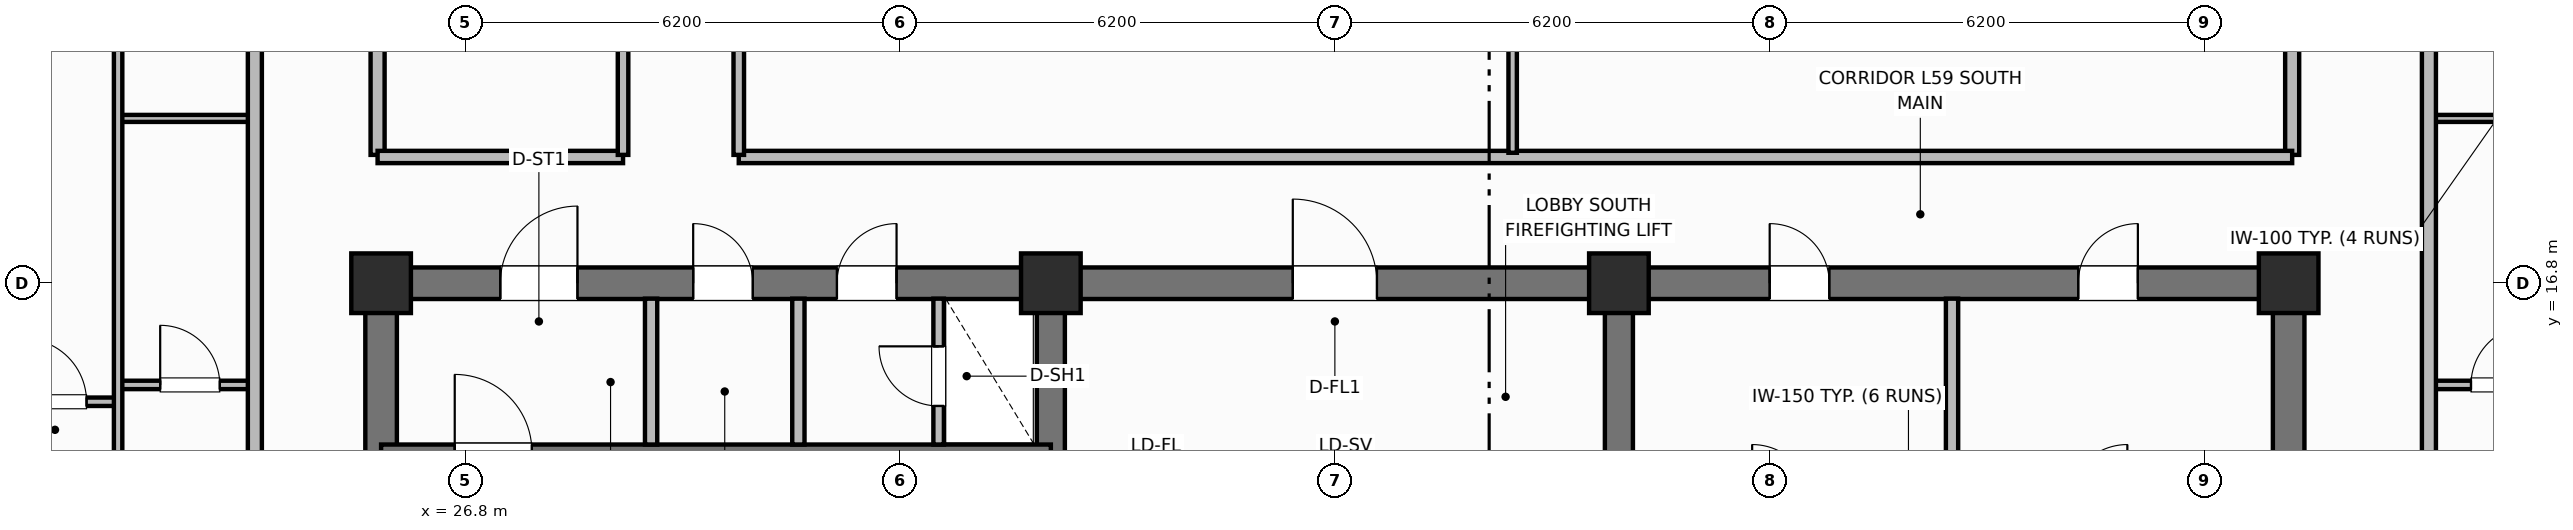
"""IFC4 building model, lengths in metres.
Left out: names, types, materials, properties, quantities, classifications, styles, units other than length and angle.
Written with IfcOpenShell. Run it as: python <this file> out.ifc"""

import sys

from ifc_helpers import new_model, si_unit, direction, frame, frame_2d, origin, origin_2d, place, context, subcontext, project, spatial, rectangle, extrude, element, fill, save


model = new_model("IFC4")
c1 = context("Model", 3, precision=1e-05, world=origin(), true_north=direction((0.0, 1.0)))
c2 = subcontext(c1, "Body", "Model", "MODEL_VIEW")
j1 = project(units=[si_unit("LENGTHUNIT", "METRE"), si_unit("PLANEANGLEUNIT", "RADIAN")], contexts=[c1])
p1 = place(None, origin())
s1 = spatial("IfcSite", under=j1, at=p1, CompositionType="ELEMENT")
p2 = place(p1, origin())
s2 = spatial("IfcBuilding", under=s1, at=p2, CompositionType="ELEMENT")
p3 = place(p2, frame((0.0, 0.0, 236.9)))
s3 = spatial("IfcBuildingStorey", under=s2, at=p3, CompositionType="ELEMENT", Elevation=236.9)
for number, where, z_axis, x_axis in (
    (1, (25.6, 10.825, 0.0), (0.0, 0.0, 1.0), (0.0, 1.0, 0.0)),
    (2, (52.8, 10.825, 0.0), (0.0, 0.0, 1.0), (0.0, 1.0, 0.0)),
):
    element("IfcWall", number, at=place(p3, frame(where, z_axis=z_axis, x_axis=x_axis)), inside=s3, PredefinedType="SHEAR", context=c2, shape_type="SweptSolid", body=[
        extrude(rectangle(XDim=5.75, YDim=0.45, at=frame_2d((2.875, 0.0))), origin(), (0.0, 0.0, 1.0), 3.7),
    ])
p4 = place(p3, frame((25.6, 16.8, 0.0), z_axis=(0.0, 0.0, 1.0), x_axis=(1.0, 0.0, 0.0)))
e3 = element("IfcWall", 3, at=p4, inside=s3, PredefinedType="SHEAR", context=c2, shape_type="SweptSolid", body=[
    extrude(rectangle(XDim=27.2, YDim=0.45, at=frame_2d((13.6, 0.0))), origin(), (0.0, 0.0, 1.0), 3.7),
])
p5 = place(p4, frame((1.7, 0.0, 0.0)))
e4 = element("IfcOpeningElement", 4, at=p5, cuts=e3, PredefinedType="OPENING", context=c2, shape_type="SweptSolid", body=[
    extrude(rectangle(XDim=1.1, YDim=2.15, at=frame_2d((0.55, 1.075))), frame((0.0, 0.235, 0.0), z_axis=(0.0, -1.0, 0.0), x_axis=(1.0, 0.0, 0.0)), (0.0, 0.0, 1.0), 0.47),
])
p6 = place(p4, frame((4.45, 0.0, 0.0)))
e5 = element("IfcOpeningElement", 5, at=p6, cuts=e3, PredefinedType="OPENING", context=c2, shape_type="SweptSolid", body=[
    extrude(rectangle(XDim=0.85, YDim=2.1, at=frame_2d((0.425, 1.05))), frame((0.0, 0.235, 0.0), z_axis=(0.0, -1.0, 0.0), x_axis=(1.0, 0.0, 0.0)), (0.0, 0.0, 1.0), 0.47),
])
p7 = place(p4, frame((6.5, 0.0, 0.0)))
e6 = element("IfcOpeningElement", 6, at=p7, cuts=e3, PredefinedType="OPENING", context=c2, shape_type="SweptSolid", body=[
    extrude(rectangle(XDim=0.85, YDim=2.1, at=frame_2d((0.425, 1.05))), frame((0.0, 0.235, 0.0), z_axis=(0.0, -1.0, 0.0), x_axis=(1.0, 0.0, 0.0)), (0.0, 0.0, 1.0), 0.47),
])
p8 = place(p4, frame((13.0, 0.0, 0.0)))
e7 = element("IfcOpeningElement", 7, at=p8, cuts=e3, PredefinedType="OPENING", context=c2, shape_type="SweptSolid", body=[
    extrude(rectangle(XDim=1.2, YDim=2.15, at=frame_2d((0.6, 1.075))), frame((0.0, 0.235, 0.0), z_axis=(0.0, -1.0, 0.0), x_axis=(1.0, 0.0, 0.0)), (0.0, 0.0, 1.0), 0.47),
])
p9 = place(p4, frame((19.8, 0.0, 0.0)))
e8 = element("IfcOpeningElement", 8, at=p9, cuts=e3, PredefinedType="OPENING", context=c2, shape_type="SweptSolid", body=[
    extrude(rectangle(XDim=0.85, YDim=2.1, at=frame_2d((0.425, 1.05))), frame((0.0, 0.235, 0.0), z_axis=(0.0, -1.0, 0.0), x_axis=(1.0, 0.0, 0.0)), (0.0, 0.0, 1.0), 0.47),
])
p10 = place(p4, frame((24.2, 0.0, 0.0)))
e9 = element("IfcOpeningElement", 9, at=p10, cuts=e3, PredefinedType="OPENING", context=c2, shape_type="SweptSolid", body=[
    extrude(rectangle(XDim=0.85, YDim=2.1, at=frame_2d((0.425, 1.05))), frame((0.0, 0.235, 0.0), z_axis=(0.0, -1.0, 0.0), x_axis=(1.0, 0.0, 0.0)), (0.0, 0.0, 1.0), 0.47),
])
for number, where, z_axis, x_axis in (
    (10, (35.15, 10.825, 0.0), (0.0, 0.0, 1.0), (0.0, 1.0, 0.0)),
    (11, (43.25, 10.825, 0.0), (0.0, 0.0, 1.0), (0.0, 1.0, 0.0)),
):
    element("IfcWall", number, at=place(p3, frame(where, z_axis=z_axis, x_axis=x_axis)), inside=s3, PredefinedType="SHEAR", context=c2, shape_type="SweptSolid", body=[
        extrude(rectangle(XDim=5.75, YDim=0.4, at=frame_2d((2.875, 0.0))), origin(), (0.0, 0.0, 1.0), 3.7),
    ])
for number, where, z_axis, x_axis in (
    (12, (25.6, 16.8, 0.0), (0.0, 0.0, 1.0), (1.0, 0.0, 0.0)),
    (13, (35.15, 16.8, 0.0), (0.0, 0.0, 1.0), (1.0, 0.0, 0.0)),
    (14, (43.25, 16.8, 0.0), (0.0, 0.0, 1.0), (1.0, 0.0, 0.0)),
    (15, (52.8, 16.8, 0.0), (0.0, 0.0, 1.0), (1.0, 0.0, 0.0)),
):
    element("IfcColumn", number, at=place(p3, frame(where, z_axis=z_axis, x_axis=x_axis)), inside=s3, PredefinedType="COLUMN", context=c2, shape_type="SweptSolid", body=[
        extrude(rectangle(XDim=0.85, YDim=0.85, at=origin_2d()), origin(), (0.0, 0.0, 1.0), 3.7),
    ])
p11 = place(p3, frame((25.6, 14.4, 0.0), z_axis=(0.0, 0.0, 1.0), x_axis=(1.0, 0.0, 0.0)))
e16 = element("IfcWall", 16, at=p11, inside=s3, PredefinedType="SHEAR", context=c2, shape_type="SweptSolid", body=[
    extrude(rectangle(XDim=9.55, YDim=0.2, at=frame_2d((4.775, 0.0))), origin(), (0.0, 0.0, 1.0), 3.7),
])
p12 = place(p11, frame((1.05, 0.0, 0.0)))
e17 = element("IfcOpeningElement", 17, at=p12, cuts=e16, PredefinedType="OPENING", context=c2, shape_type="SweptSolid", body=[
    extrude(rectangle(XDim=1.1, YDim=2.15, at=frame_2d((0.55, 1.075))), frame((0.0, 0.11, 0.0), z_axis=(0.0, -1.0, 0.0), x_axis=(1.0, 0.0, 0.0)), (0.0, 0.0, 1.0), 0.22),
])
for number, where, z_axis, x_axis in (
    (18, (29.45, 14.5, 0.0), (0.0, 0.0, 1.0), (0.0, 1.0, 0.0)),
    (19, (31.55, 14.5, 0.0), (0.0, 0.0, 1.0), (0.0, 1.0, 0.0)),
):
    element("IfcWall", number, at=place(p3, frame(where, z_axis=z_axis, x_axis=x_axis)), inside=s3, PredefinedType="PARTITIONING", context=c2, shape_type="SweptSolid", body=[
        extrude(rectangle(XDim=2.08, YDim=0.175, at=frame_2d((1.04, 0.0))), origin(), (0.0, 0.0, 1.0), 2.56),
    ])
p13 = place(p3, frame((33.55, 14.5, 0.0), z_axis=(0.0, 0.0, 1.0), x_axis=(0.0, 1.0, 0.0)))
e20 = element("IfcWall", 20, at=p13, inside=s3, PredefinedType="PARTITIONING", context=c2, shape_type="SweptSolid", body=[
    extrude(rectangle(XDim=2.08, YDim=0.15, at=frame_2d((1.04, 0.0))), origin(), (0.0, 0.0, 1.0), 2.56),
])
p14 = place(p13, frame((0.55, 0.0, 0.0)))
e21 = element("IfcOpeningElement", 21, at=p14, cuts=e20, PredefinedType="OPENING", context=c2, shape_type="SweptSolid", body=[
    extrude(rectangle(XDim=0.85, YDim=2.05, at=frame_2d((0.425, 1.025))), frame((0.0, 0.085, 0.0), z_axis=(0.0, -1.0, 0.0), x_axis=(1.0, 0.0, 0.0)), (0.0, 0.0, 1.0), 0.17),
])
p15 = place(p3, frame((48.0, 10.95, 0.0), z_axis=(0.0, 0.0, 1.0), x_axis=(0.0, 1.0, 0.0)))
e22 = element("IfcWall", 22, at=p15, inside=s3, PredefinedType="PARTITIONING", context=c2, shape_type="SweptSolid", body=[
    extrude(rectangle(XDim=5.63, YDim=0.175, at=frame_2d((2.815, 0.0))), origin(), (0.0, 0.0, 1.0), 2.56),
])
for number, where, z_axis, x_axis in (
    (23, (25.55, 18.63, 0.0), (0.0, 0.0, 1.0), (0.0, 1.0, 0.0)),
    (24, (52.85, 18.63, 0.0), (0.0, 0.0, 1.0), (0.0, 1.0, 0.0)),
):
    element("IfcWall", number, at=place(p3, frame(where, z_axis=z_axis, x_axis=x_axis)), inside=s3, PredefinedType="PARTITIONING", context=c2, shape_type="SweptSolid", body=[
        extrude(rectangle(XDim=19.14, YDim=0.2, at=frame_2d((9.57, 0.0))), origin(), (0.0, 0.0, 1.0), 2.56),
    ])
p16 = place(p3, frame((25.55, 18.6, 0.0), z_axis=(0.0, 0.0, 1.0), x_axis=(1.0, 0.0, 0.0)))
e25 = element("IfcWall", 25, at=p16, inside=s3, PredefinedType="PARTITIONING", context=c2, shape_type="SweptSolid", body=[
    extrude(rectangle(XDim=3.5, YDim=0.175, at=frame_2d((1.75, 0.0))), origin(), (0.0, 0.0, 1.0), 2.56),
])
p17 = place(p3, frame((30.7, 18.6, 0.0), z_axis=(0.0, 0.0, 1.0), x_axis=(1.0, 0.0, 0.0)))
e26 = element("IfcWall", 26, at=p17, inside=s3, PredefinedType="PARTITIONING", context=c2, shape_type="SweptSolid", body=[
    extrude(rectangle(XDim=22.15, YDim=0.175, at=frame_2d((11.075, 0.0))), origin(), (0.0, 0.0, 1.0), 2.56),
])
p18 = place(p3, frame((41.735, 18.66, 0.0), z_axis=(0.0, 0.0, 1.0), x_axis=(0.0, 1.0, 0.0)))
e27 = element("IfcWall", 27, at=p18, inside=s3, PredefinedType="PARTITIONING", context=c2, shape_type="SweptSolid", body=[
    extrude(rectangle(XDim=10.648, YDim=0.12, at=frame_2d((5.324, 0.0))), origin(), (0.0, 0.0, 1.0), 2.56),
])
p19 = place(p18, frame((2.0, 0.0, 0.0)))
e28 = element("IfcOpeningElement", 28, at=p19, cuts=e27, PredefinedType="OPENING", context=c2, shape_type="SweptSolid", body=[
    extrude(rectangle(XDim=0.9, YDim=2.1, at=frame_2d((0.45, 1.05))), frame((0.0, 0.07, 0.0), z_axis=(0.0, -1.0, 0.0), x_axis=(1.0, 0.0, 0.0)), (0.0, 0.0, 1.0), 0.14),
])
p20 = place(p3, frame((29.05, 18.63, 0.0), z_axis=(0.0, 0.0, 1.0), x_axis=(0.0, 1.0, 0.0)))
e29 = element("IfcWall", 29, at=p20, inside=s3, PredefinedType="PARTITIONING", context=c2, shape_type="SweptSolid", body=[
    extrude(rectangle(XDim=19.14, YDim=0.15, at=frame_2d((9.57, 0.0))), origin(), (0.0, 0.0, 1.0), 2.56),
])
p21 = place(p20, frame((5.5, 0.0, 0.0)))
e30 = element("IfcOpeningElement", 30, at=p21, cuts=e29, PredefinedType="OPENING", context=c2, shape_type="SweptSolid", body=[
    extrude(rectangle(XDim=1.0, YDim=2.15, at=frame_2d((0.5, 1.075))), frame((0.0, 0.085, 0.0), z_axis=(0.0, -1.0, 0.0), x_axis=(1.0, 0.0, 0.0)), (0.0, 0.0, 1.0), 0.17),
])
p22 = place(p3, frame((30.7, 18.63, 0.0), z_axis=(0.0, 0.0, 1.0), x_axis=(0.0, 1.0, 0.0)))
e31 = element("IfcWall", 31, at=p22, inside=s3, PredefinedType="PARTITIONING", context=c2, shape_type="SweptSolid", body=[
    extrude(rectangle(XDim=19.14, YDim=0.15, at=frame_2d((9.57, 0.0))), origin(), (0.0, 0.0, 1.0), 2.56),
])
p23 = place(p22, frame((2.2, 0.0, 0.0)))
e32 = element("IfcOpeningElement", 32, at=p23, cuts=e31, PredefinedType="OPENING", context=c2, shape_type="SweptSolid", body=[
    extrude(rectangle(XDim=1.0, YDim=2.15, at=frame_2d((0.5, 1.075))), frame((0.0, 0.085, 0.0), z_axis=(0.0, -1.0, 0.0), x_axis=(1.0, 0.0, 0.0)), (0.0, 0.0, 1.0), 0.17),
])
p24 = place(p22, frame((12.719, 0.0, 0.0)))
e33 = element("IfcOpeningElement", 33, at=p24, cuts=e31, PredefinedType="OPENING", context=c2, shape_type="SweptSolid", body=[
    extrude(rectangle(XDim=1.0, YDim=2.15, at=frame_2d((0.5, 1.075))), frame((0.0, 0.085, 0.0), z_axis=(0.0, -1.0, 0.0), x_axis=(1.0, 0.0, 0.0)), (0.0, 0.0, 1.0), 0.17),
])
p25 = place(p3, frame((21.85, 15.35, 0.0), z_axis=(0.0, 0.0, 1.0), x_axis=(1.0, 0.0, 0.0)))
e34 = element("IfcWall", 34, at=p25, inside=s3, PredefinedType="PARTITIONING", context=c2, shape_type="SweptSolid", body=[
    extrude(rectangle(XDim=1.95, YDim=0.12, at=frame_2d((0.975, 0.0))), origin(), (0.0, 0.0, 1.0), 2.56),
])
p26 = place(p25, frame((0.6, 0.0, 0.0)))
e35 = element("IfcOpeningElement", 35, at=p26, cuts=e34, PredefinedType="OPENING", context=c2, shape_type="SweptSolid", body=[
    extrude(rectangle(XDim=0.85, YDim=2.1, at=frame_2d((0.425, 1.05))), frame((0.0, 0.07, 0.0), z_axis=(0.0, -1.0, 0.0), x_axis=(1.0, 0.0, 0.0)), (0.0, 0.0, 1.0), 0.14),
])
p27 = place(p3, frame((21.85, 19.15, 0.0), z_axis=(0.0, 0.0, 1.0), x_axis=(1.0, 0.0, 0.0)))
e36 = element("IfcWall", 36, at=p27, inside=s3, PredefinedType="PARTITIONING", context=c2, shape_type="SweptSolid", body=[
    extrude(rectangle(XDim=1.95, YDim=0.1, at=frame_2d((0.975, 0.0))), origin(), (0.0, 0.0, 1.0), 2.56),
])
p28 = place(p3, frame((19.53, 15.11, 0.0), z_axis=(0.0, 0.0, 1.0), x_axis=(1.0, 0.0, 0.0)))
e37 = element("IfcWall", 37, at=p28, inside=s3, PredefinedType="PARTITIONING", context=c2, shape_type="SweptSolid", body=[
    extrude(rectangle(XDim=2.32, YDim=0.12, at=frame_2d((1.16, 0.0))), origin(), (0.0, 0.0, 1.0), 2.56),
])
p29 = place(p28, frame((0.97, 0.0, 0.0)))
e38 = element("IfcOpeningElement", 38, at=p29, cuts=e37, PredefinedType="OPENING", context=c2, shape_type="SweptSolid", body=[
    extrude(rectangle(XDim=0.9, YDim=2.1, at=frame_2d((0.45, 1.05))), frame((0.0, 0.07, 0.0), z_axis=(0.0, -1.0, 0.0), x_axis=(1.0, 0.0, 0.0)), (0.0, 0.0, 1.0), 0.14),
])
p30 = place(p3, frame((21.85, 9.99, 0.0), z_axis=(0.0, 0.0, 1.0), x_axis=(0.0, 1.0, 0.0)))
e39 = element("IfcWall", 39, at=p30, inside=s3, PredefinedType="PARTITIONING", context=c2, shape_type="SweptSolid", body=[
    extrude(rectangle(XDim=12.67, YDim=0.12, at=frame_2d((6.335, 0.0))), origin(), (0.0, 0.0, 1.0), 2.56),
])
p31 = place(p30, frame((0.41, 0.0, 0.0)))
e40 = element("IfcOpeningElement", 40, at=p31, cuts=e39, PredefinedType="OPENING", context=c2, shape_type="SweptSolid", body=[
    extrude(rectangle(XDim=0.9, YDim=2.1, at=frame_2d((0.45, 1.05))), frame((0.0, 0.07, 0.0), z_axis=(0.0, -1.0, 0.0), x_axis=(1.0, 0.0, 0.0)), (0.0, 0.0, 1.0), 0.14),
])
p32 = place(p30, frame((10.51, 0.0, 0.0)))
e41 = element("IfcOpeningElement", 41, at=p32, cuts=e39, PredefinedType="OPENING", context=c2, shape_type="SweptSolid", body=[
    extrude(rectangle(XDim=0.82, YDim=2.08, at=frame_2d((0.41, 1.04))), frame((0.0, 0.07, 0.0), z_axis=(0.0, -1.0, 0.0), x_axis=(1.0, 0.0, 0.0)), (0.0, 0.0, 1.0), 0.14),
])
p33 = place(p3, frame((23.8, 9.95, 0.0), z_axis=(0.0, 0.0, 1.0), x_axis=(0.0, 1.0, 0.0)))
e42 = element("IfcWall", 42, at=p33, inside=s3, PredefinedType="PARTITIONING", context=c2, shape_type="SweptSolid", body=[
    extrude(rectangle(XDim=36.5, YDim=0.2, at=frame_2d((18.25, 0.0))), origin(), (0.0, 0.0, 1.0), 2.56),
])
p34 = place(p33, frame((3.25, 0.0, 0.0)))
e43 = element("IfcOpeningElement", 43, at=p34, cuts=e42, PredefinedType="OPENING", context=c2, shape_type="SweptSolid", body=[
    extrude(rectangle(XDim=1.0, YDim=2.15, at=frame_2d((0.5, 1.075))), frame((0.0, 0.11, 0.0), z_axis=(0.0, -1.0, 0.0), x_axis=(1.0, 0.0, 0.0)), (0.0, 0.0, 1.0), 0.22),
])
p35 = place(p33, frame((13.3, 0.0, 0.0)))
e44 = element("IfcOpeningElement", 44, at=p35, cuts=e42, PredefinedType="OPENING", context=c2, shape_type="SweptSolid", body=[
    extrude(rectangle(XDim=1.0, YDim=2.15, at=frame_2d((0.5, 1.075))), frame((0.0, 0.11, 0.0), z_axis=(0.0, -1.0, 0.0), x_axis=(1.0, 0.0, 0.0)), (0.0, 0.0, 1.0), 0.22),
])
p36 = place(p33, frame((25.005, 0.0, 0.0)))
e45 = element("IfcOpeningElement", 45, at=p36, cuts=e42, PredefinedType="OPENING", context=c2, shape_type="SweptSolid", body=[
    extrude(rectangle(XDim=1.0, YDim=2.15, at=frame_2d((0.5, 1.075))), frame((0.0, 0.11, 0.0), z_axis=(0.0, -1.0, 0.0), x_axis=(1.0, 0.0, 0.0)), (0.0, 0.0, 1.0), 0.22),
])
p37 = place(p3, frame((54.8, 15.35, 0.0), z_axis=(0.0, 0.0, 1.0), x_axis=(1.0, 0.0, 0.0)))
e46 = element("IfcWall", 46, at=p37, inside=s3, PredefinedType="PARTITIONING", context=c2, shape_type="SweptSolid", body=[
    extrude(rectangle(XDim=1.95, YDim=0.12, at=frame_2d((0.975, 0.0))), origin(), (0.0, 0.0, 1.0), 2.56),
])
p38 = place(p37, frame((0.6, 0.0, 0.0)))
e47 = element("IfcOpeningElement", 47, at=p38, cuts=e46, PredefinedType="OPENING", context=c2, shape_type="SweptSolid", body=[
    extrude(rectangle(XDim=0.85, YDim=2.1, at=frame_2d((0.425, 1.05))), frame((0.0, 0.07, 0.0), z_axis=(0.0, -1.0, 0.0), x_axis=(1.0, 0.0, 0.0)), (0.0, 0.0, 1.0), 0.14),
])
p39 = place(p3, frame((54.8, 19.15, 0.0), z_axis=(0.0, 0.0, 1.0), x_axis=(1.0, 0.0, 0.0)))
e48 = element("IfcWall", 48, at=p39, inside=s3, PredefinedType="PARTITIONING", context=c2, shape_type="SweptSolid", body=[
    extrude(rectangle(XDim=1.95, YDim=0.1, at=frame_2d((0.975, 0.0))), origin(), (0.0, 0.0, 1.0), 2.56),
])
p40 = place(p3, frame((54.8, 9.95, 0.0), z_axis=(0.0, 0.0, 1.0), x_axis=(0.0, 1.0, 0.0)))
e49 = element("IfcWall", 49, at=p40, inside=s3, PredefinedType="PARTITIONING", context=c2, shape_type="SweptSolid", body=[
    extrude(rectangle(XDim=36.5, YDim=0.2, at=frame_2d((18.25, 0.0))), origin(), (0.0, 0.0, 1.0), 2.56),
])
p41 = place(p40, frame((3.25, 0.0, 0.0)))
e50 = element("IfcOpeningElement", 50, at=p41, cuts=e49, PredefinedType="OPENING", context=c2, shape_type="SweptSolid", body=[
    extrude(rectangle(XDim=1.0, YDim=2.15, at=frame_2d((0.5, 1.075))), frame((0.0, 0.11, 0.0), z_axis=(0.0, -1.0, 0.0), x_axis=(1.0, 0.0, 0.0)), (0.0, 0.0, 1.0), 0.22),
])
p42 = place(p40, frame((12.96, 0.0, 0.0)))
e51 = element("IfcOpeningElement", 51, at=p42, cuts=e49, PredefinedType="OPENING", context=c2, shape_type="SweptSolid", body=[
    extrude(rectangle(XDim=1.0, YDim=2.15, at=frame_2d((0.5, 1.075))), frame((0.0, 0.11, 0.0), z_axis=(0.0, -1.0, 0.0), x_axis=(1.0, 0.0, 0.0)), (0.0, 0.0, 1.0), 0.22),
])
p43 = place(p40, frame((24.3, 0.0, 0.0)))
e52 = element("IfcOpeningElement", 52, at=p43, cuts=e49, PredefinedType="OPENING", context=c2, shape_type="SweptSolid", body=[
    extrude(rectangle(XDim=1.0, YDim=2.15, at=frame_2d((0.5, 1.075))), frame((0.0, 0.11, 0.0), z_axis=(0.0, -1.0, 0.0), x_axis=(1.0, 0.0, 0.0)), (0.0, 0.0, 1.0), 0.22),
])
p44 = place(p12, origin())
e53 = element("IfcDoor", 53, at=p44, inside=s3, OperationType="SINGLE_SWING_LEFT", PredefinedType="DOOR", context=c2, shape_type="SweptSolid", body=[
    extrude(rectangle(XDim=1.1, YDim=2.15, at=frame_2d((0.55, 1.075))), frame((0.0, 0.025, 0.0), z_axis=(0.0, -1.0, 0.0), x_axis=(1.0, 0.0, 0.0)), (0.0, 0.0, 1.0), 0.05),
])
fill(e17, e53)
p45 = place(p14, origin())
e54 = element("IfcDoor", 54, at=p45, inside=s3, OperationType="SINGLE_SWING_RIGHT", PredefinedType="TRAPDOOR", context=c2, shape_type="SweptSolid", body=[
    extrude(rectangle(XDim=0.85, YDim=2.05, at=frame_2d((0.425, 1.025))), frame((0.0, 0.025, 0.0), z_axis=(0.0, -1.0, 0.0), x_axis=(1.0, 0.0, 0.0)), (0.0, 0.0, 1.0), 0.05),
])
fill(e21, e54)
p46 = place(p26, origin())
e55 = element("IfcDoor", 55, at=p46, inside=s3, OperationType="SINGLE_SWING_LEFT", PredefinedType="DOOR", context=c2, shape_type="SweptSolid", body=[
    extrude(rectangle(XDim=0.85, YDim=2.1, at=frame_2d((0.425, 1.05))), frame((0.0, 0.025, 0.0), z_axis=(0.0, -1.0, 0.0), x_axis=(1.0, 0.0, 0.0)), (0.0, 0.0, 1.0), 0.05),
])
fill(e35, e55)
p47 = place(p29, origin())
e56 = element("IfcDoor", 56, at=p47, inside=s3, OperationType="SINGLE_SWING_LEFT", PredefinedType="DOOR", context=c2, shape_type="SweptSolid", body=[
    extrude(rectangle(XDim=0.9, YDim=2.1, at=frame_2d((0.45, 1.05))), frame((0.0, 0.025, 0.0), z_axis=(0.0, -1.0, 0.0), x_axis=(1.0, 0.0, 0.0)), (0.0, 0.0, 1.0), 0.05),
])
fill(e38, e56)
p48 = place(p38, origin())
e57 = element("IfcDoor", 57, at=p48, inside=s3, OperationType="SINGLE_SWING_RIGHT", PredefinedType="DOOR", context=c2, shape_type="SweptSolid", body=[
    extrude(rectangle(XDim=0.85, YDim=2.1, at=frame_2d((0.425, 1.05))), frame((0.0, 0.025, 0.0), z_axis=(0.0, -1.0, 0.0), x_axis=(1.0, 0.0, 0.0)), (0.0, 0.0, 1.0), 0.05),
])
fill(e47, e57)
p49 = place(p5, origin())
e58 = element("IfcDoor", 58, at=p49, inside=s3, OperationType="SINGLE_SWING_RIGHT", PredefinedType="DOOR", context=c2, shape_type="SweptSolid", body=[
    extrude(rectangle(XDim=1.1, YDim=2.15, at=frame_2d((0.55, 1.075))), frame((0.0, 0.025, 0.0), z_axis=(0.0, -1.0, 0.0), x_axis=(1.0, 0.0, 0.0)), (0.0, 0.0, 1.0), 0.05),
])
fill(e4, e58)
p50 = place(p6, origin())
e59 = element("IfcDoor", 59, at=p50, inside=s3, OperationType="SINGLE_SWING_LEFT", PredefinedType="DOOR", context=c2, shape_type="SweptSolid", body=[
    extrude(rectangle(XDim=0.85, YDim=2.1, at=frame_2d((0.425, 1.05))), frame((0.0, 0.025, 0.0), z_axis=(0.0, -1.0, 0.0), x_axis=(1.0, 0.0, 0.0)), (0.0, 0.0, 1.0), 0.05),
])
fill(e5, e59)
p51 = place(p7, origin())
e60 = element("IfcDoor", 60, at=p51, inside=s3, OperationType="SINGLE_SWING_RIGHT", PredefinedType="DOOR", context=c2, shape_type="SweptSolid", body=[
    extrude(rectangle(XDim=0.85, YDim=2.1, at=frame_2d((0.425, 1.05))), frame((0.0, 0.025, 0.0), z_axis=(0.0, -1.0, 0.0), x_axis=(1.0, 0.0, 0.0)), (0.0, 0.0, 1.0), 0.05),
])
fill(e6, e60)
p52 = place(p8, origin())
e61 = element("IfcDoor", 61, at=p52, inside=s3, OperationType="SINGLE_SWING_LEFT", PredefinedType="DOOR", context=c2, shape_type="SweptSolid", body=[
    extrude(rectangle(XDim=1.2, YDim=2.15, at=frame_2d((0.6, 1.075))), frame((0.0, 0.025, 0.0), z_axis=(0.0, -1.0, 0.0), x_axis=(1.0, 0.0, 0.0)), (0.0, 0.0, 1.0), 0.05),
])
fill(e7, e61)
p53 = place(p9, origin())
e62 = element("IfcDoor", 62, at=p53, inside=s3, OperationType="SINGLE_SWING_LEFT", PredefinedType="DOOR", context=c2, shape_type="SweptSolid", body=[
    extrude(rectangle(XDim=0.85, YDim=2.1, at=frame_2d((0.425, 1.05))), frame((0.0, 0.025, 0.0), z_axis=(0.0, -1.0, 0.0), x_axis=(1.0, 0.0, 0.0)), (0.0, 0.0, 1.0), 0.05),
])
fill(e8, e62)
p54 = place(p10, origin())
e63 = element("IfcDoor", 63, at=p54, inside=s3, OperationType="SINGLE_SWING_RIGHT", PredefinedType="DOOR", context=c2, shape_type="SweptSolid", body=[
    extrude(rectangle(XDim=0.85, YDim=2.1, at=frame_2d((0.425, 1.05))), frame((0.0, 0.025, 0.0), z_axis=(0.0, -1.0, 0.0), x_axis=(1.0, 0.0, 0.0)), (0.0, 0.0, 1.0), 0.05),
])
fill(e9, e63)
save(model, sys.argv[1])
